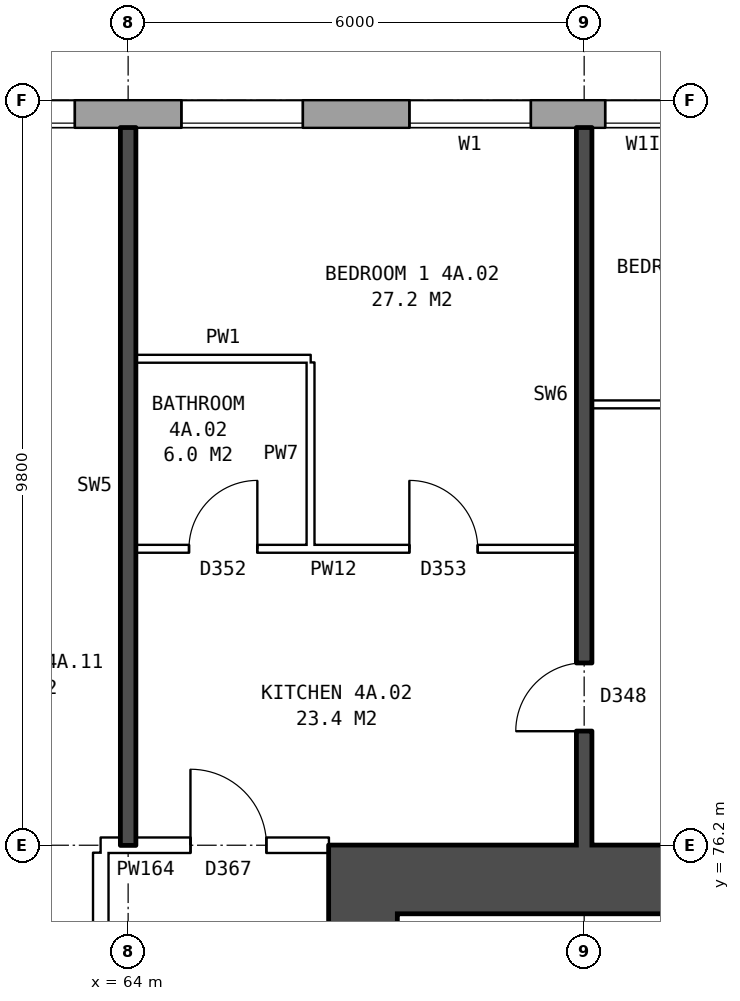
"""IFC4 building model, lengths in metres.
Left out: names, types, materials, properties, quantities, classifications, styles, units other than length and angle.
Written with IfcOpenShell. Run it as: python <this file> out.ifc"""

import sys

from ifc_helpers import new_model, si_unit, direction, frame, frame_2d, origin, place, context, subcontext, project, spatial, rectangle, extrude, element, fill, save


model = new_model("IFC4")
c1 = context("Model", 3, precision=1e-05, world=origin(), true_north=direction((0.0, 1.0)))
c2 = subcontext(c1, "Body", "Model", "MODEL_VIEW")
j1 = project(units=[si_unit("LENGTHUNIT", "METRE"), si_unit("PLANEANGLEUNIT", "RADIAN")], contexts=[c1])
p1 = place(None, origin())
s1 = spatial("IfcSite", under=j1, at=p1, CompositionType="ELEMENT")
p2 = place(p1, origin())
s2 = spatial("IfcBuilding", under=s1, at=p2, CompositionType="ELEMENT")
p3 = place(p2, frame((0.0, 0.0, 19.5)))
s3 = spatial("IfcBuildingStorey", under=s2, at=p3, CompositionType="ELEMENT", Elevation=19.5)
p4 = place(p3, frame((72.925, 85.82, 0.0), z_axis=(0.0, 0.0, 1.0), x_axis=(-1.0, 0.0, 0.0)))
e1 = element("IfcWall", 1, at=p4, inside=s3, PredefinedType="STANDARD", context=c2, shape_type="SweptSolid", body=[
    extrude(rectangle(XDim=50.101, YDim=0.36, at=frame_2d((25.05, 0.0))), origin(), (0.0, 0.0, 1.0), 2.85),
])
p5 = place(p4, frame((0.75, 0.0, 0.8)))
e2 = element("IfcOpeningElement", 2, at=p5, cuts=e1, PredefinedType="OPENING", context=c2, shape_type="SweptSolid", body=[
    extrude(rectangle(XDim=0.6, YDim=0.9, at=frame_2d((0.3, 0.45))), frame((0.0, 0.19, 0.0), z_axis=(0.0, -1.0, 0.0), x_axis=(1.0, 0.0, 0.0)), (0.0, 0.0, 1.0), 0.38),
])
p6 = place(p4, frame((3.625, 0.0, 0.8)))
e3 = element("IfcOpeningElement", 3, at=p6, cuts=e1, PredefinedType="OPENING", context=c2, shape_type="SweptSolid", body=[
    extrude(rectangle(XDim=1.6, YDim=1.8, at=frame_2d((0.8, 0.9))), frame((0.0, 0.19, 0.0), z_axis=(0.0, -1.0, 0.0), x_axis=(1.0, 0.0, 0.0)), (0.0, 0.0, 1.0), 0.38),
])
p7 = place(p4, frame((6.625, 0.0, 0.8)))
e4 = element("IfcOpeningElement", 4, at=p7, cuts=e1, PredefinedType="OPENING", context=c2, shape_type="SweptSolid", body=[
    extrude(rectangle(XDim=1.6, YDim=1.8, at=frame_2d((0.8, 0.9))), frame((0.0, 0.19, 0.0), z_axis=(0.0, -1.0, 0.0), x_axis=(1.0, 0.0, 0.0)), (0.0, 0.0, 1.0), 0.38),
])
p8 = place(p4, frame((9.625, 0.0, 0.8)))
e5 = element("IfcOpeningElement", 5, at=p8, cuts=e1, PredefinedType="OPENING", context=c2, shape_type="SweptSolid", body=[
    extrude(rectangle(XDim=1.6, YDim=1.8, at=frame_2d((0.8, 0.9))), frame((0.0, 0.19, 0.0), z_axis=(0.0, -1.0, 0.0), x_axis=(1.0, 0.0, 0.0)), (0.0, 0.0, 1.0), 0.38),
])
p9 = place(p4, frame((12.625, 0.0, 0.8)))
e6 = element("IfcOpeningElement", 6, at=p9, cuts=e1, PredefinedType="OPENING", context=c2, shape_type="SweptSolid", body=[
    extrude(rectangle(XDim=1.6, YDim=1.8, at=frame_2d((0.8, 0.9))), frame((0.0, 0.19, 0.0), z_axis=(0.0, -1.0, 0.0), x_axis=(1.0, 0.0, 0.0)), (0.0, 0.0, 1.0), 0.38),
])
p10 = place(p4, frame((15.625, 0.0, 0.8)))
e7 = element("IfcOpeningElement", 7, at=p10, cuts=e1, PredefinedType="OPENING", context=c2, shape_type="SweptSolid", body=[
    extrude(rectangle(XDim=1.6, YDim=1.8, at=frame_2d((0.8, 0.9))), frame((0.0, 0.19, 0.0), z_axis=(0.0, -1.0, 0.0), x_axis=(1.0, 0.0, 0.0)), (0.0, 0.0, 1.0), 0.38),
])
p11 = place(p4, frame((18.625, 0.0, 0.8)))
e8 = element("IfcOpeningElement", 8, at=p11, cuts=e1, PredefinedType="OPENING", context=c2, shape_type="SweptSolid", body=[
    extrude(rectangle(XDim=1.6, YDim=1.8, at=frame_2d((0.8, 0.9))), frame((0.0, 0.19, 0.0), z_axis=(0.0, -1.0, 0.0), x_axis=(1.0, 0.0, 0.0)), (0.0, 0.0, 1.0), 0.38),
])
p12 = place(p4, frame((21.625, 0.0, 0.8)))
e9 = element("IfcOpeningElement", 9, at=p12, cuts=e1, PredefinedType="OPENING", context=c2, shape_type="SweptSolid", body=[
    extrude(rectangle(XDim=1.6, YDim=1.8, at=frame_2d((0.8, 0.9))), frame((0.0, 0.19, 0.0), z_axis=(0.0, -1.0, 0.0), x_axis=(1.0, 0.0, 0.0)), (0.0, 0.0, 1.0), 0.38),
])
p13 = place(p4, frame((24.625, 0.0, 0.8)))
e10 = element("IfcOpeningElement", 10, at=p13, cuts=e1, PredefinedType="OPENING", context=c2, shape_type="SweptSolid", body=[
    extrude(rectangle(XDim=1.6, YDim=1.8, at=frame_2d((0.8, 0.9))), frame((0.0, 0.19, 0.0), z_axis=(0.0, -1.0, 0.0), x_axis=(1.0, 0.0, 0.0)), (0.0, 0.0, 1.0), 0.38),
])
p14 = place(p4, frame((27.625, 0.0, 0.8)))
e11 = element("IfcOpeningElement", 11, at=p14, cuts=e1, PredefinedType="OPENING", context=c2, shape_type="SweptSolid", body=[
    extrude(rectangle(XDim=1.6, YDim=1.8, at=frame_2d((0.8, 0.9))), frame((0.0, 0.19, 0.0), z_axis=(0.0, -1.0, 0.0), x_axis=(1.0, 0.0, 0.0)), (0.0, 0.0, 1.0), 0.38),
])
p15 = place(p4, frame((30.625, 0.0, 0.8)))
e12 = element("IfcOpeningElement", 12, at=p15, cuts=e1, PredefinedType="OPENING", context=c2, shape_type="SweptSolid", body=[
    extrude(rectangle(XDim=1.6, YDim=1.8, at=frame_2d((0.8, 0.9))), frame((0.0, 0.19, 0.0), z_axis=(0.0, -1.0, 0.0), x_axis=(1.0, 0.0, 0.0)), (0.0, 0.0, 1.0), 0.38),
])
p16 = place(p4, frame((33.625, 0.0, 0.8)))
e13 = element("IfcOpeningElement", 13, at=p16, cuts=e1, PredefinedType="OPENING", context=c2, shape_type="SweptSolid", body=[
    extrude(rectangle(XDim=1.6, YDim=1.8, at=frame_2d((0.8, 0.9))), frame((0.0, 0.19, 0.0), z_axis=(0.0, -1.0, 0.0), x_axis=(1.0, 0.0, 0.0)), (0.0, 0.0, 1.0), 0.38),
])
p17 = place(p4, frame((36.625, 0.0, 0.8)))
e14 = element("IfcOpeningElement", 14, at=p17, cuts=e1, PredefinedType="OPENING", context=c2, shape_type="SweptSolid", body=[
    extrude(rectangle(XDim=1.6, YDim=1.8, at=frame_2d((0.8, 0.9))), frame((0.0, 0.19, 0.0), z_axis=(0.0, -1.0, 0.0), x_axis=(1.0, 0.0, 0.0)), (0.0, 0.0, 1.0), 0.38),
])
p18 = place(p4, frame((39.625, 0.0, 0.8)))
e15 = element("IfcOpeningElement", 15, at=p18, cuts=e1, PredefinedType="OPENING", context=c2, shape_type="SweptSolid", body=[
    extrude(rectangle(XDim=1.6, YDim=1.8, at=frame_2d((0.8, 0.9))), frame((0.0, 0.19, 0.0), z_axis=(0.0, -1.0, 0.0), x_axis=(1.0, 0.0, 0.0)), (0.0, 0.0, 1.0), 0.38),
])
p19 = place(p4, frame((42.625, 0.0, 0.8)))
e16 = element("IfcOpeningElement", 16, at=p19, cuts=e1, PredefinedType="OPENING", context=c2, shape_type="SweptSolid", body=[
    extrude(rectangle(XDim=1.6, YDim=1.8, at=frame_2d((0.8, 0.9))), frame((0.0, 0.19, 0.0), z_axis=(0.0, -1.0, 0.0), x_axis=(1.0, 0.0, 0.0)), (0.0, 0.0, 1.0), 0.38),
])
p20 = place(p4, frame((45.625, 0.0, 0.8)))
e17 = element("IfcOpeningElement", 17, at=p20, cuts=e1, PredefinedType="OPENING", context=c2, shape_type="SweptSolid", body=[
    extrude(rectangle(XDim=1.6, YDim=1.8, at=frame_2d((0.8, 0.9))), frame((0.0, 0.19, 0.0), z_axis=(0.0, -1.0, 0.0), x_axis=(1.0, 0.0, 0.0)), (0.0, 0.0, 1.0), 0.38),
])
p21 = place(p4, frame((1.65, 0.0, 0.8)))
e18 = element("IfcOpeningElement", 18, at=p21, cuts=e1, PredefinedType="OPENING", context=c2, shape_type="SweptSolid", body=[
    extrude(rectangle(XDim=1.0, YDim=1.5, at=frame_2d((0.5, 0.75))), frame((0.0, 0.19, 0.0), z_axis=(0.0, -1.0, 0.0), x_axis=(1.0, 0.0, 0.0)), (0.0, 0.0, 1.0), 0.38),
])
p22 = place(p3, frame((67.09, 64.7, 0.0), z_axis=(0.0, 0.0, 1.0), x_axis=(0.0, 1.0, 0.0)))
e19 = element("IfcWall", 19, at=p22, inside=s3, PredefinedType="SHEAR", context=c2, shape_type="SweptSolid", body=[
    extrude(rectangle(XDim=10.6, YDim=0.9, at=frame_2d((5.3, 0.0))), origin(), (0.0, 0.0, 1.0), 2.85),
])
p23 = place(p22, frame((0.425, 0.0, 0.0)))
e20 = element("IfcOpeningElement", 20, at=p23, cuts=e19, PredefinedType="OPENING", context=c2, shape_type="SweptSolid", body=[
    extrude(rectangle(XDim=1.1, YDim=2.1, at=frame_2d((0.55, 1.05))), frame((0.0, 0.46, 0.0), z_axis=(0.0, -1.0, 0.0), x_axis=(1.0, 0.0, 0.0)), (0.0, 0.0, 1.0), 0.92),
])
p24 = place(p22, frame((9.0, 0.0, 0.0)))
e21 = element("IfcOpeningElement", 21, at=p24, cuts=e19, PredefinedType="OPENING", context=c2, shape_type="SweptSolid", body=[
    extrude(rectangle(XDim=1.1, YDim=2.1, at=frame_2d((0.55, 1.05))), frame((0.0, 0.46, 0.0), z_axis=(0.0, -1.0, 0.0), x_axis=(1.0, 0.0, 0.0)), (0.0, 0.0, 1.0), 0.92),
])
p25 = place(p3, frame((66.64, 75.75, 0.0), z_axis=(0.0, 0.0, 1.0), x_axis=(1.0, 0.0, 0.0)))
e22 = element("IfcWall", 22, at=p25, inside=s3, PredefinedType="SHEAR", context=c2, shape_type="SweptSolid", body=[
    extrude(rectangle(XDim=9.0, YDim=0.9, at=frame_2d((4.5, 0.0))), origin(), (0.0, 0.0, 1.0), 2.85),
])
p26 = place(p3, frame((63.64, 63.9, 0.0), z_axis=(0.0, 0.0, 1.0), x_axis=(0.0, 1.0, 0.0)))
e23 = element("IfcWall", 23, at=p26, inside=s3, PredefinedType="PARTITIONING", context=c2, shape_type="SweptSolid", body=[
    extrude(rectangle(XDim=12.2, YDim=0.2, at=frame_2d((6.1, 0.0))), origin(), (0.0, 0.0, 1.0), 2.85),
])
p27 = place(p26, frame((5.1, 0.0, 0.0)))
e24 = element("IfcOpeningElement", 24, at=p27, cuts=e23, PredefinedType="OPENING", context=c2, shape_type="SweptSolid", body=[
    extrude(rectangle(XDim=2.0, YDim=2.1, at=frame_2d((1.0, 1.05))), frame((0.0, 0.11, 0.0), z_axis=(0.0, -1.0, 0.0), x_axis=(1.0, 0.0, 0.0)), (0.0, 0.0, 1.0), 0.22),
])
p28 = place(p3, frame((63.64, 76.2, 0.0), z_axis=(0.0, 0.0, 1.0), x_axis=(1.0, 0.0, 0.0)))
e25 = element("IfcWall", 25, at=p28, inside=s3, PredefinedType="PARTITIONING", context=c2, shape_type="SweptSolid", body=[
    extrude(rectangle(XDim=3.0, YDim=0.2, at=frame_2d((1.5, 0.0))), origin(), (0.0, 0.0, 1.0), 2.85),
])
p29 = place(p28, frame((1.18, 0.0, 0.0)))
e26 = element("IfcOpeningElement", 26, at=p29, cuts=e25, PredefinedType="OPENING", context=c2, shape_type="SweptSolid", body=[
    extrude(rectangle(XDim=1.0, YDim=2.1, at=frame_2d((0.5, 1.05))), frame((0.0, 0.11, 0.0), z_axis=(0.0, -1.0, 0.0), x_axis=(1.0, 0.0, 0.0)), (0.0, 0.0, 1.0), 0.22),
])
p30 = place(p3, frame((64.1, 80.1, 0.0), z_axis=(0.0, 0.0, 1.0), x_axis=(1.0, 0.0, 0.0)))
e27 = element("IfcWall", 27, at=p30, inside=s3, PredefinedType="PARTITIONING", context=c2, shape_type="SweptSolid", body=[
    extrude(rectangle(XDim=5.8, YDim=0.1, at=frame_2d((2.9, 0.0))), origin(), (0.0, 0.0, 1.0), 2.85),
])
p31 = place(p30, frame((3.6, 0.0, 0.0)))
e28 = element("IfcOpeningElement", 28, at=p31, cuts=e27, PredefinedType="OPENING", context=c2, shape_type="SweptSolid", body=[
    extrude(rectangle(XDim=0.9, YDim=2.1, at=frame_2d((0.45, 1.05))), frame((0.0, 0.06, 0.0), z_axis=(0.0, -1.0, 0.0), x_axis=(1.0, 0.0, 0.0)), (0.0, 0.0, 1.0), 0.12),
])
p32 = place(p30, frame((0.7, 0.0, 0.0)))
e29 = element("IfcOpeningElement", 29, at=p32, cuts=e27, PredefinedType="OPENING", context=c2, shape_type="SweptSolid", body=[
    extrude(rectangle(XDim=0.9, YDim=2.1, at=frame_2d((0.45, 1.05))), frame((0.0, 0.06, 0.0), z_axis=(0.0, -1.0, 0.0), x_axis=(1.0, 0.0, 0.0)), (0.0, 0.0, 1.0), 0.12),
])
p33 = place(p3, frame((70.1, 82.0, 0.0), z_axis=(0.0, 0.0, 1.0), x_axis=(1.0, 0.0, 0.0)))
e30 = element("IfcWall", 30, at=p33, inside=s3, PredefinedType="PARTITIONING", context=c2, shape_type="SweptSolid", body=[
    extrude(rectangle(XDim=5.54, YDim=0.1, at=frame_2d((2.77, 0.0))), origin(), (0.0, 0.0, 1.0), 2.85),
])
p34 = place(p33, frame((2.32, 0.0, 0.0)))
e31 = element("IfcOpeningElement", 31, at=p34, cuts=e30, PredefinedType="OPENING", context=c2, shape_type="SweptSolid", body=[
    extrude(rectangle(XDim=0.9, YDim=2.1, at=frame_2d((0.45, 1.05))), frame((0.0, 0.06, 0.0), z_axis=(0.0, -1.0, 0.0), x_axis=(1.0, 0.0, 0.0)), (0.0, 0.0, 1.0), 0.12),
])
p35 = place(p3, frame((64.1, 82.6, 0.0), z_axis=(0.0, 0.0, 1.0), x_axis=(1.0, 0.0, 0.0)))
e32 = element("IfcWall", 32, at=p35, inside=s3, PredefinedType="PARTITIONING", context=c2, shape_type="SweptSolid", body=[
    extrude(rectangle(XDim=2.3, YDim=0.1, at=frame_2d((1.15, 0.0))), origin(), (0.0, 0.0, 1.0), 2.85),
])
p36 = place(p3, frame((64.0, 76.2, 0.0), z_axis=(0.0, 0.0, 1.0), x_axis=(0.0, 1.0, 0.0)))
e33 = element("IfcWall", 33, at=p36, inside=s3, PredefinedType="SOLIDWALL", context=c2, shape_type="SweptSolid", body=[
    extrude(rectangle(XDim=9.44, YDim=0.2, at=frame_2d((4.72, 0.0))), origin(), (0.0, 0.0, 1.0), 2.85),
])
p37 = place(p3, frame((66.4, 80.15, 0.0), z_axis=(0.0, 0.0, 1.0), x_axis=(0.0, 1.0, 0.0)))
e34 = element("IfcWall", 34, at=p37, inside=s3, PredefinedType="PARTITIONING", context=c2, shape_type="SweptSolid", body=[
    extrude(rectangle(XDim=2.4, YDim=0.1, at=frame_2d((1.2, 0.0))), origin(), (0.0, 0.0, 1.0), 2.85),
])
p38 = place(p3, frame((70.0, 76.2, 0.0), z_axis=(0.0, 0.0, 1.0), x_axis=(0.0, 1.0, 0.0)))
e35 = element("IfcWall", 35, at=p38, inside=s3, PredefinedType="SOLIDWALL", context=c2, shape_type="SweptSolid", body=[
    extrude(rectangle(XDim=9.44, YDim=0.2, at=frame_2d((4.72, 0.0))), origin(), (0.0, 0.0, 1.0), 2.85),
])
p39 = place(p38, frame((1.5, 0.0, 0.0)))
e36 = element("IfcOpeningElement", 36, at=p39, cuts=e35, PredefinedType="OPENING", context=c2, shape_type="SweptSolid", body=[
    extrude(rectangle(XDim=0.9, YDim=2.1, at=frame_2d((0.45, 1.05))), frame((0.0, 0.11, 0.0), z_axis=(0.0, -1.0, 0.0), x_axis=(1.0, 0.0, 0.0)), (0.0, 0.0, 1.0), 0.22),
])
p40 = place(p6, origin())
e37 = element("IfcWindow", 37, at=p40, inside=s3, PartitioningType="SINGLE_PANEL", PredefinedType="WINDOW", context=c2, shape_type="SweptSolid", body=[
    extrude(rectangle(XDim=1.6, YDim=1.8, at=frame_2d((0.8, 0.9))), frame((0.0, 0.15, 0.0), z_axis=(0.0, -1.0, 0.0), x_axis=(1.0, 0.0, 0.0)), (0.0, 0.0, 1.0), 0.06),
])
fill(e3, e37)
p41 = place(p7, origin())
e38 = element("IfcWindow", 38, at=p41, inside=s3, PartitioningType="SINGLE_PANEL", PredefinedType="WINDOW", context=c2, shape_type="SweptSolid", body=[
    extrude(rectangle(XDim=1.6, YDim=1.8, at=frame_2d((0.8, 0.9))), frame((0.0, 0.15, 0.0), z_axis=(0.0, -1.0, 0.0), x_axis=(1.0, 0.0, 0.0)), (0.0, 0.0, 1.0), 0.06),
])
fill(e4, e38)
p42 = place(p8, origin())
e39 = element("IfcWindow", 39, at=p42, inside=s3, PartitioningType="SINGLE_PANEL", PredefinedType="WINDOW", context=c2, shape_type="SweptSolid", body=[
    extrude(rectangle(XDim=1.6, YDim=1.8, at=frame_2d((0.8, 0.9))), frame((0.0, 0.15, 0.0), z_axis=(0.0, -1.0, 0.0), x_axis=(1.0, 0.0, 0.0)), (0.0, 0.0, 1.0), 0.06),
])
fill(e5, e39)
p43 = place(p31, origin())
e40 = element("IfcDoor", 40, at=p43, inside=s3, OperationType="SINGLE_SWING_LEFT", PredefinedType="DOOR", context=c2, shape_type="SweptSolid", body=[
    extrude(rectangle(XDim=0.9, YDim=2.1, at=frame_2d((0.45, 1.05))), frame((0.0, 0.025, 0.0), z_axis=(0.0, -1.0, 0.0), x_axis=(1.0, 0.0, 0.0)), (0.0, 0.0, 1.0), 0.05),
])
fill(e28, e40)
p44 = place(p29, origin())
e41 = element("IfcDoor", 41, at=p44, inside=s3, OperationType="SINGLE_SWING_LEFT", PredefinedType="DOOR", context=c2, shape_type="SweptSolid", body=[
    extrude(rectangle(XDim=1.0, YDim=2.1, at=frame_2d((0.5, 1.05))), frame((0.0, 0.025, 0.0), z_axis=(0.0, -1.0, 0.0), x_axis=(1.0, 0.0, 0.0)), (0.0, 0.0, 1.0), 0.05),
])
fill(e26, e41)
p45 = place(p39, origin())
e42 = element("IfcDoor", 42, at=p45, inside=s3, OperationType="SINGLE_SWING_LEFT", PredefinedType="DOOR", context=c2, shape_type="SweptSolid", body=[
    extrude(rectangle(XDim=0.9, YDim=2.1, at=frame_2d((0.45, 1.05))), frame((0.0, 0.025, 0.0), z_axis=(0.0, -1.0, 0.0), x_axis=(1.0, 0.0, 0.0)), (0.0, 0.0, 1.0), 0.05),
])
fill(e36, e42)
p46 = place(p32, origin())
e43 = element("IfcDoor", 43, at=p46, inside=s3, OperationType="SINGLE_SWING_RIGHT", PredefinedType="DOOR", context=c2, shape_type="SweptSolid", body=[
    extrude(rectangle(XDim=0.9, YDim=2.1, at=frame_2d((0.45, 1.05))), frame((0.0, 0.025, 0.0), z_axis=(0.0, -1.0, 0.0), x_axis=(1.0, 0.0, 0.0)), (0.0, 0.0, 1.0), 0.05),
])
fill(e29, e43)
p47 = place(p21, origin())
e44 = element("IfcWindow", 44, at=p47, inside=s3, PartitioningType="SINGLE_PANEL", PredefinedType="WINDOW", context=c2, shape_type="SweptSolid", body=[
    extrude(rectangle(XDim=1.0, YDim=1.5, at=frame_2d((0.5, 0.75))), frame((0.0, 0.15, 0.0), z_axis=(0.0, -1.0, 0.0), x_axis=(1.0, 0.0, 0.0)), (0.0, 0.0, 1.0), 0.06),
])
fill(e18, e44)
save(model, sys.argv[1])
